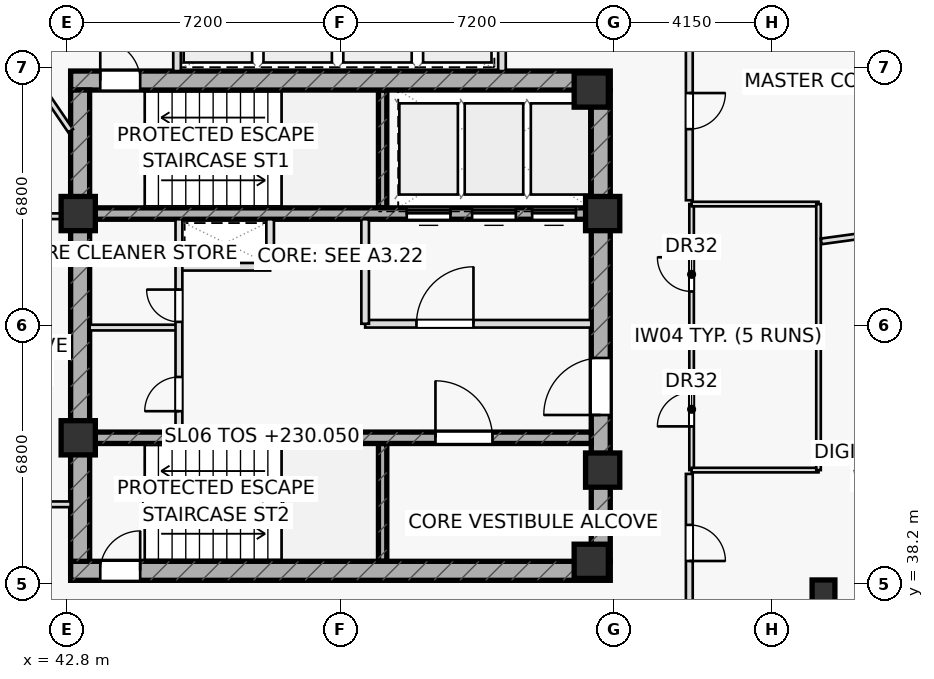
"""IFC4 building model, lengths in metres.
Left out: names, types, materials, properties, quantities, classifications, styles, units other than length and angle.
Written with IfcOpenShell. Run it as: python <this file> out.ifc"""

import sys

from ifc_helpers import new_model, si_unit, direction, frame, frame_2d, origin, origin_2d, place, context, subcontext, project, spatial, rectangle, hollow_rectangle, extrude, element, fill, save


model = new_model("IFC4")
c1 = context("Model", 3, precision=1e-05, world=origin(), true_north=direction((0.0, 1.0)))
c2 = subcontext(c1, "Body", "Model", "MODEL_VIEW")
j1 = project(units=[si_unit("LENGTHUNIT", "METRE"), si_unit("PLANEANGLEUNIT", "RADIAN")], contexts=[c1])
p1 = place(None, origin())
s1 = spatial("IfcSite", under=j1, at=p1, CompositionType="ELEMENT")
p2 = place(p1, origin())
s2 = spatial("IfcBuilding", under=s1, at=p2, CompositionType="ELEMENT")
p3 = place(p2, frame((0.0, 0.0, 230.05)))
s3 = spatial("IfcBuildingStorey", under=s2, at=p3, CompositionType="ELEMENT", Elevation=230.05)
for number, where, z_axis, x_axis in (
    (1, (51.11, 48.1, 0.0), (0.0, 0.0, 1.0), (0.0, 1.0, 0.0)),
    (2, (51.11, 38.8, 0.0), (0.0, 0.0, 1.0), (0.0, 1.0, 0.0)),
):
    element("IfcWall", number, at=place(p3, frame(where, z_axis=z_axis, x_axis=x_axis)), inside=s3, PredefinedType="SHEAR", context=c2, shape_type="SweptSolid", body=[
        extrude(rectangle(XDim=3.1, YDim=0.22, at=frame_2d((1.55, 0.0))), origin(), (0.0, 0.0, 1.0), 3.65),
    ])
p4 = place(p3, frame((42.9, 51.45, 0.0), z_axis=(0.0, 0.0, 1.0), x_axis=(1.0, 0.0, 0.0)))
e3 = element("IfcWall", 3, at=p4, inside=s3, PredefinedType="SHEAR", context=c2, shape_type="SweptSolid", body=[
    extrude(rectangle(XDim=14.2, YDim=0.5, at=frame_2d((7.1, 0.0))), origin(), (0.0, 0.0, 1.0), 3.65),
])
p5 = place(p4, frame((0.78, 0.0, 0.0)))
e4 = element("IfcOpeningElement", 4, at=p5, cuts=e3, PredefinedType="OPENING", context=c2, shape_type="SweptSolid", body=[
    extrude(rectangle(XDim=1.05, YDim=2.2, at=frame_2d((0.525, 1.1))), frame((0.0, 0.26, 0.0), z_axis=(0.0, -1.0, 0.0), x_axis=(1.0, 0.0, 0.0)), (0.0, 0.0, 1.0), 0.52),
])
p6 = place(p3, frame((42.9, 38.55, 0.0), z_axis=(0.0, 0.0, 1.0), x_axis=(1.0, 0.0, 0.0)))
e5 = element("IfcWall", 5, at=p6, inside=s3, PredefinedType="SHEAR", context=c2, shape_type="SweptSolid", body=[
    extrude(rectangle(XDim=14.2, YDim=0.5, at=frame_2d((7.1, 0.0))), origin(), (0.0, 0.0, 1.0), 3.65),
])
p7 = place(p6, frame((0.78, 0.0, 0.0)))
e6 = element("IfcOpeningElement", 6, at=p7, cuts=e5, PredefinedType="OPENING", context=c2, shape_type="SweptSolid", body=[
    extrude(rectangle(XDim=1.05, YDim=2.2, at=frame_2d((0.525, 1.1))), frame((0.0, 0.26, 0.0), z_axis=(0.0, -1.0, 0.0), x_axis=(1.0, 0.0, 0.0)), (0.0, 0.0, 1.0), 0.52),
])
p8 = place(p3, frame((43.15, 38.8, 0.0), z_axis=(0.0, 0.0, 1.0), x_axis=(0.0, 1.0, 0.0)))
e7 = element("IfcWall", 7, at=p8, inside=s3, PredefinedType="SHEAR", context=c2, shape_type="SweptSolid", body=[
    extrude(rectangle(XDim=12.4, YDim=0.5, at=frame_2d((6.2, 0.0))), origin(), (0.0, 0.0, 1.0), 3.65),
])
p9 = place(p3, frame((56.85, 38.8, 0.0), z_axis=(0.0, 0.0, 1.0), x_axis=(0.0, 1.0, 0.0)))
e8 = element("IfcWall", 8, at=p9, inside=s3, PredefinedType="SHEAR", context=c2, shape_type="SweptSolid", body=[
    extrude(rectangle(XDim=12.4, YDim=0.5, at=frame_2d((6.2, 0.0))), origin(), (0.0, 0.0, 1.0), 3.65),
])
p10 = place(p9, frame((3.85, 0.0, 0.0)))
e9 = element("IfcOpeningElement", 9, at=p10, cuts=e8, PredefinedType="OPENING", context=c2, shape_type="SweptSolid", body=[
    extrude(rectangle(XDim=1.5, YDim=2.2, at=frame_2d((0.75, 1.1))), frame((0.0, 0.26, 0.0), z_axis=(0.0, -1.0, 0.0), x_axis=(1.0, 0.0, 0.0)), (0.0, 0.0, 1.0), 0.52),
])
p11 = place(p3, frame((43.4, 47.95, 0.0), z_axis=(0.0, 0.0, 1.0), x_axis=(1.0, 0.0, 0.0)))
e10 = element("IfcWall", 10, at=p11, inside=s3, PredefinedType="SHEAR", context=c2, shape_type="SweptSolid", body=[
    extrude(rectangle(XDim=13.2, YDim=0.3, at=frame_2d((6.6, 0.0))), origin(), (0.0, 0.0, 1.0), 3.65),
])
p12 = place(p11, frame((8.345, 0.0, 0.0)))
e11 = element("IfcOpeningElement", 11, at=p12, cuts=e10, PredefinedType="OPENING", context=c2, shape_type="SweptSolid", body=[
    extrude(rectangle(XDim=1.15, YDim=2.2, at=frame_2d((0.575, 1.1))), frame((0.0, 0.16, 0.0), z_axis=(0.0, -1.0, 0.0), x_axis=(1.0, 0.0, 0.0)), (0.0, 0.0, 1.0), 0.32),
])
p13 = place(p11, frame((10.065, 0.0, 0.0)))
e12 = element("IfcOpeningElement", 12, at=p13, cuts=e10, PredefinedType="OPENING", context=c2, shape_type="SweptSolid", body=[
    extrude(rectangle(XDim=1.15, YDim=2.2, at=frame_2d((0.575, 1.1))), frame((0.0, 0.16, 0.0), z_axis=(0.0, -1.0, 0.0), x_axis=(1.0, 0.0, 0.0)), (0.0, 0.0, 1.0), 0.32),
])
p14 = place(p11, frame((11.645, 0.0, 0.0)))
e13 = element("IfcOpeningElement", 13, at=p14, cuts=e10, PredefinedType="OPENING", context=c2, shape_type="SweptSolid", body=[
    extrude(rectangle(XDim=1.15, YDim=2.2, at=frame_2d((0.575, 1.1))), frame((0.0, 0.16, 0.0), z_axis=(0.0, -1.0, 0.0), x_axis=(1.0, 0.0, 0.0)), (0.0, 0.0, 1.0), 0.32),
])
p15 = place(p3, frame((43.4, 42.05, 0.0), z_axis=(0.0, 0.0, 1.0), x_axis=(1.0, 0.0, 0.0)))
e14 = element("IfcWall", 14, at=p15, inside=s3, PredefinedType="SHEAR", context=c2, shape_type="SweptSolid", body=[
    extrude(rectangle(XDim=13.2, YDim=0.3, at=frame_2d((6.6, 0.0))), origin(), (0.0, 0.0, 1.0), 3.65),
])
p16 = place(p15, frame((9.1, 0.0, 0.0)))
e15 = element("IfcOpeningElement", 15, at=p16, cuts=e14, PredefinedType="OPENING", context=c2, shape_type="SweptSolid", body=[
    extrude(rectangle(XDim=1.5, YDim=2.2, at=frame_2d((0.75, 1.1))), frame((0.0, 0.16, 0.0), z_axis=(0.0, -1.0, 0.0), x_axis=(1.0, 0.0, 0.0)), (0.0, 0.0, 1.0), 0.32),
])
for number, where, z_axis, x_axis in (
    (16, (43.1, 47.95, 0.0), (0.0, 0.0, 1.0), (1.0, 0.0, 0.0)),
    (17, (56.9, 47.95, 0.0), (0.0, 0.0, 1.0), (1.0, 0.0, 0.0)),
    (18, (56.6, 51.2, 0.0), (0.0, 0.0, 1.0), (1.0, 0.0, 0.0)),
    (19, (43.1, 42.05, 0.0), (0.0, 0.0, 1.0), (1.0, 0.0, 0.0)),
    (20, (56.9, 41.2, 0.0), (0.0, 0.0, 1.0), (1.0, 0.0, 0.0)),
    (21, (56.6, 38.8, 0.0), (0.0, 0.0, 1.0), (1.0, 0.0, 0.0)),
):
    element("IfcColumn", number, at=place(p3, frame(where, z_axis=z_axis, x_axis=x_axis)), inside=s3, PredefinedType="COLUMN", context=c2, shape_type="SweptSolid", body=[
        extrude(rectangle(XDim=0.9, YDim=0.9, at=origin_2d()), origin(), (0.0, 0.0, 1.0), 3.65),
    ])
p17 = place(p3, frame((62.711, 38.009, 0.0), z_axis=(0.0, 0.0, 1.0), x_axis=(1.0, 0.0, 0.0)))
e22 = element("IfcColumn", 22, at=p17, inside=s3, PredefinedType="COLUMN", context=c2, shape_type="SweptSolid", body=[
    extrude(hollow_rectangle(XDim=0.6, YDim=0.6, WallThickness=0.036, at=origin_2d()), origin(), (0.0, 0.0, 1.0), 3.65),
])
for number, where, z_axis, x_axis in (
    (23, (45.7, 51.7, 0.0), (0.0, 0.0, 1.0), (0.0, 1.0, 0.0)),
    (24, (54.25, 51.7, 0.0), (0.0, 0.0, 1.0), (0.0, 1.0, 0.0)),
):
    element("IfcWall", number, at=place(p3, frame(where, z_axis=z_axis, x_axis=x_axis)), inside=s3, PredefinedType="PARTITIONING", context=c2, shape_type="SweptSolid", body=[
        extrude(rectangle(XDim=2.6, YDim=0.2, at=frame_2d((1.3, 0.0))), origin(), (0.0, 0.0, 1.0), 3.65),
    ])
p18 = place(p3, frame((45.75, 46.55, 0.0), z_axis=(0.0, 0.0, 1.0), x_axis=(1.0, 0.0, 0.0)))
e25 = element("IfcWall", 25, at=p18, inside=s3, PredefinedType="PARTITIONING", context=c2, shape_type="SweptSolid", body=[
    extrude(rectangle(XDim=2.4, YDim=0.2, at=frame_2d((1.2, 0.0))), origin(), (0.0, 0.0, 1.0), 3.65),
])
p19 = place(p3, frame((48.15, 46.55, 0.0), z_axis=(0.0, 0.0, 1.0), x_axis=(0.0, 1.0, 0.0)))
e26 = element("IfcWall", 26, at=p19, inside=s3, PredefinedType="PARTITIONING", context=c2, shape_type="SweptSolid", body=[
    extrude(rectangle(XDim=1.25, YDim=0.2, at=frame_2d((0.625, 0.0))), origin(), (0.0, 0.0, 1.0), 3.65),
])
p20 = place(p3, frame((50.65, 45.05, 0.0), z_axis=(0.0, 0.0, 1.0), x_axis=(1.0, 0.0, 0.0)))
e27 = element("IfcWall", 27, at=p20, inside=s3, PredefinedType="PARTITIONING", context=c2, shape_type="SweptSolid", body=[
    extrude(rectangle(XDim=5.95, YDim=0.2, at=frame_2d((2.975, 0.0))), origin(), (0.0, 0.0, 1.0), 3.65),
])
p21 = place(p20, frame((1.35, 0.0, 0.0)))
e28 = element("IfcOpeningElement", 28, at=p21, cuts=e27, PredefinedType="OPENING", context=c2, shape_type="SweptSolid", body=[
    extrude(rectangle(XDim=1.5, YDim=2.2, at=frame_2d((0.75, 1.1))), frame((0.0, 0.11, 0.0), z_axis=(0.0, -1.0, 0.0), x_axis=(1.0, 0.0, 0.0)), (0.0, 0.0, 1.0), 0.22),
])
p22 = place(p3, frame((50.65, 45.05, 0.0), z_axis=(0.0, 0.0, 1.0), x_axis=(0.0, 1.0, 0.0)))
e29 = element("IfcWall", 29, at=p22, inside=s3, PredefinedType="PARTITIONING", context=c2, shape_type="SweptSolid", body=[
    extrude(rectangle(XDim=2.75, YDim=0.2, at=frame_2d((1.375, 0.0))), origin(), (0.0, 0.0, 1.0), 3.65),
])
p23 = place(p3, frame((43.4, 44.95, 0.0), z_axis=(0.0, 0.0, 1.0), x_axis=(1.0, 0.0, 0.0)))
e30 = element("IfcWall", 30, at=p23, inside=s3, PredefinedType="PARTITIONING", context=c2, shape_type="SweptSolid", body=[
    extrude(rectangle(XDim=2.35, YDim=0.15, at=frame_2d((1.175, 0.0))), origin(), (0.0, 0.0, 1.0), 3.65),
])
p24 = place(p3, frame((45.75, 42.2, 0.0), z_axis=(0.0, 0.0, 1.0), x_axis=(0.0, 1.0, 0.0)))
e31 = element("IfcWall", 31, at=p24, inside=s3, PredefinedType="PARTITIONING", context=c2, shape_type="SweptSolid", body=[
    extrude(rectangle(XDim=5.6, YDim=0.18, at=frame_2d((2.8, 0.0))), origin(), (0.0, 0.0, 1.0), 3.65),
])
p25 = place(p24, frame((0.55, 0.0, 0.0)))
e32 = element("IfcOpeningElement", 32, at=p25, cuts=e31, PredefinedType="OPENING", context=c2, shape_type="SweptSolid", body=[
    extrude(rectangle(XDim=0.9, YDim=2.05, at=frame_2d((0.45, 1.025))), frame((0.0, 0.1, 0.0), z_axis=(0.0, -1.0, 0.0), x_axis=(1.0, 0.0, 0.0)), (0.0, 0.0, 1.0), 0.2),
])
p26 = place(p24, frame((2.9, 0.0, 0.0)))
e33 = element("IfcOpeningElement", 33, at=p26, cuts=e31, PredefinedType="OPENING", context=c2, shape_type="SweptSolid", body=[
    extrude(rectangle(XDim=0.85, YDim=2.05, at=frame_2d((0.425, 1.025))), frame((0.0, 0.1, 0.0), z_axis=(0.0, -1.0, 0.0), x_axis=(1.0, 0.0, 0.0)), (0.0, 0.0, 1.0), 0.2),
])
p27 = place(p3, frame((69.792, 50.388, 0.0), z_axis=(0.0, 0.0, 1.0), x_axis=(-0.732769799181, 0.680476613418, 0.0)))
e34 = element("IfcWall", 34, at=p27, inside=s3, PredefinedType="PARTITIONING", context=c2, shape_type="SweptSolid", body=[
    extrude(rectangle(XDim=11.378, YDim=0.15, at=frame_2d((5.689, 0.0))), origin(), (0.0, 0.0, 1.0), 3.025),
])
p28 = place(p3, frame((37.14, 40.3, 0.0), z_axis=(0.0, 0.0, 1.0), x_axis=(1.0, 0.0, 0.0)))
e35 = element("IfcWall", 35, at=p28, inside=s3, PredefinedType="PARTITIONING", context=c2, shape_type="SweptSolid", body=[
    extrude(rectangle(XDim=5.76, YDim=0.15, at=frame_2d((2.88, 0.0))), origin(), (0.0, 0.0, 1.0), 3.025),
])
p29 = place(p28, frame((3.21, 0.0, 0.0)))
e36 = element("IfcOpeningElement", 36, at=p29, cuts=e35, PredefinedType="OPENING", context=c2, shape_type="SweptSolid", body=[
    extrude(rectangle(XDim=0.95, YDim=2.05, at=frame_2d((0.475, 1.025))), frame((0.0, 0.085, 0.0), z_axis=(0.0, -1.0, 0.0), x_axis=(1.0, 0.0, 0.0)), (0.0, 0.0, 1.0), 0.17),
])
p30 = place(p3, frame((37.14, 47.88, 0.0), z_axis=(0.0, 0.0, 1.0), x_axis=(1.0, 0.0, 0.0)))
e37 = element("IfcWall", 37, at=p30, inside=s3, PredefinedType="PARTITIONING", context=c2, shape_type="SweptSolid", body=[
    extrude(rectangle(XDim=5.76, YDim=0.15, at=frame_2d((2.88, 0.0))), origin(), (0.0, 0.0, 1.0), 3.025),
])
p31 = place(p3, frame((59.24, 41.2, 0.0), z_axis=(0.0, 0.0, 1.0), x_axis=(0.0, 1.0, 0.0)))
e38 = element("IfcWall", 38, at=p31, inside=s3, PredefinedType="PARTITIONING", context=c2, shape_type="SweptSolid", body=[
    extrude(rectangle(XDim=7.0, YDim=0.12, at=frame_2d((3.5, 0.0))), origin(), (0.0, 0.0, 1.0), 3.65),
])
p32 = place(p31, frame((1.15, 0.0, 0.0)))
e39 = element("IfcOpeningElement", 39, at=p32, cuts=e38, PredefinedType="OPENING", context=c2, shape_type="SweptSolid", body=[
    extrude(rectangle(XDim=0.9, YDim=2.05, at=frame_2d((0.45, 1.025))), frame((0.0, 0.07, 0.0), z_axis=(0.0, -1.0, 0.0), x_axis=(1.0, 0.0, 0.0)), (0.0, 0.0, 1.0), 0.14),
])
p33 = place(p31, frame((4.7, 0.0, 0.0)))
e40 = element("IfcOpeningElement", 40, at=p33, cuts=e38, PredefinedType="OPENING", context=c2, shape_type="SweptSolid", body=[
    extrude(rectangle(XDim=0.9, YDim=2.05, at=frame_2d((0.45, 1.025))), frame((0.0, 0.07, 0.0), z_axis=(0.0, -1.0, 0.0), x_axis=(1.0, 0.0, 0.0)), (0.0, 0.0, 1.0), 0.14),
])
p34 = place(p3, frame((59.24, 41.2, 0.0), z_axis=(0.0, 0.0, 1.0), x_axis=(1.0, 0.0, 0.0)))
e41 = element("IfcWall", 41, at=p34, inside=s3, PredefinedType="PARTITIONING", context=c2, shape_type="SweptSolid", body=[
    extrude(rectangle(XDim=3.34, YDim=0.12, at=frame_2d((1.67, 0.0))), origin(), (0.0, 0.0, 1.0), 3.025),
])
for number, where, z_axis, x_axis in (
    (42, (59.24, 44.65, 0.0), (0.0, 0.0, 1.0), (1.0, 0.0, 0.0)),
    (43, (59.24, 48.2, 0.0), (0.0, 0.0, 1.0), (1.0, 0.0, 0.0)),
):
    element("IfcWall", number, at=place(p3, frame(where, z_axis=z_axis, x_axis=x_axis)), inside=s3, PredefinedType="PARTITIONING", context=c2, shape_type="SweptSolid", body=[
        extrude(rectangle(XDim=3.34, YDim=0.12, at=frame_2d((1.67, 0.0))), origin(), (0.0, 0.0, 1.0), 3.65),
    ])
p35 = place(p3, frame((62.58, 41.2, 0.0), z_axis=(0.0, 0.0, 1.0), x_axis=(0.0, 1.0, 0.0)))
e44 = element("IfcWall", 44, at=p35, inside=s3, PredefinedType="PARTITIONING", context=c2, shape_type="SweptSolid", body=[
    extrude(rectangle(XDim=7.0, YDim=0.12, at=frame_2d((3.5, 0.0))), origin(), (0.0, 0.0, 1.0), 3.325),
])
p36 = place(p3, frame((59.18, 37.752, 0.0), z_axis=(0.0, 0.0, 1.0), x_axis=(0.869846344998, -0.493322750432, 0.0)))
e45 = element("IfcWall", 45, at=p36, inside=s3, PredefinedType="PARTITIONING", context=c2, shape_type="SweptSolid", body=[
    extrude(rectangle(XDim=5.242, YDim=0.15, at=frame_2d((2.621, 0.0))), origin(), (0.0, 0.0, 1.0), 3.135),
])
p37 = place(p3, frame((62.65, 47.218, 0.0), z_axis=(0.0, 0.0, 1.0), x_axis=(0.990815623429, 0.135219822396, 0.0)))
e46 = element("IfcWall", 46, at=p37, inside=s3, PredefinedType="PARTITIONING", context=c2, shape_type="SweptSolid", body=[
    extrude(rectangle(XDim=9.605, YDim=0.15, at=frame_2d((4.803, 0.0))), origin(), (0.0, 0.0, 1.0), 3.135),
])
p38 = place(p3, frame((42.9, 50.128, 0.0), z_axis=(0.0, 0.0, 1.0), x_axis=(-0.563742719505, 0.825950450212, 0.0)))
e47 = element("IfcWall", 47, at=p38, inside=s3, PredefinedType="PARTITIONING", context=c2, shape_type="SweptSolid", body=[
    extrude(rectangle(XDim=18.773, YDim=0.15, at=frame_2d((9.386, 0.0))), origin(), (0.0, 0.0, 1.0), 3.025),
])
p39 = place(p38, frame((1.35, 0.0, 0.0)))
e48 = element("IfcOpeningElement", 48, at=p39, cuts=e47, PredefinedType="OPENING", context=c2, shape_type="SweptSolid", body=[
    extrude(rectangle(XDim=0.95, YDim=2.05, at=frame_2d((0.475, 1.025))), frame((0.0, 0.085, 0.0), z_axis=(0.0, -1.0, 0.0), x_axis=(1.0, 0.0, 0.0)), (0.0, 0.0, 1.0), 0.17),
])
p40 = place(p3, frame((59.18, 53.83, 0.0), z_axis=(0.0, 0.0, 1.0), x_axis=(0.0, -1.0, 0.0)))
e49 = element("IfcWall", 49, at=p40, inside=s3, PredefinedType="PARTITIONING", context=c2, shape_type="SweptSolid", body=[
    extrude(rectangle(XDim=5.53, YDim=0.18, at=frame_2d((2.765, 0.0))), origin(), (0.0, 0.0, 1.0), 3.65),
])
p41 = place(p40, frame((2.709, 0.0, 0.0)))
e50 = element("IfcOpeningElement", 50, at=p41, cuts=e49, PredefinedType="OPENING", context=c2, shape_type="SweptSolid", body=[
    extrude(rectangle(XDim=0.95, YDim=2.05, at=frame_2d((0.475, 1.025))), frame((0.0, 0.1, 0.0), z_axis=(0.0, -1.0, 0.0), x_axis=(1.0, 0.0, 0.0)), (0.0, 0.0, 1.0), 0.2),
])
p42 = place(p3, frame((59.18, 41.1, 0.0), z_axis=(0.0, 0.0, 1.0), x_axis=(0.0, -1.0, 0.0)))
e51 = element("IfcWall", 51, at=p42, inside=s3, PredefinedType="PARTITIONING", context=c2, shape_type="SweptSolid", body=[
    extrude(rectangle(XDim=4.93, YDim=0.18, at=frame_2d((2.465, 0.0))), origin(), (0.0, 0.0, 1.0), 3.325),
])
p43 = place(p42, frame((1.342, 0.0, 0.0)))
e52 = element("IfcOpeningElement", 52, at=p43, cuts=e51, PredefinedType="OPENING", context=c2, shape_type="SweptSolid", body=[
    extrude(rectangle(XDim=0.95, YDim=2.05, at=frame_2d((0.475, 1.025))), frame((0.0, 0.1, 0.0), z_axis=(0.0, -1.0, 0.0), x_axis=(1.0, 0.0, 0.0)), (0.0, 0.0, 1.0), 0.2),
])
p44 = place(p5, origin())
e53 = element("IfcDoor", 53, at=p44, inside=s3, OperationType="SINGLE_SWING_LEFT", PredefinedType="DOOR", context=c2, shape_type="SweptSolid", body=[
    extrude(rectangle(XDim=1.05, YDim=2.2, at=frame_2d((0.525, 1.1))), frame((0.0, 0.025, 0.0), z_axis=(0.0, -1.0, 0.0), x_axis=(1.0, 0.0, 0.0)), (0.0, 0.0, 1.0), 0.05),
])
fill(e4, e53)
p45 = place(p7, origin())
e54 = element("IfcDoor", 54, at=p45, inside=s3, OperationType="SINGLE_SWING_RIGHT", PredefinedType="DOOR", context=c2, shape_type="SweptSolid", body=[
    extrude(rectangle(XDim=1.05, YDim=2.2, at=frame_2d((0.525, 1.1))), frame((0.0, 0.025, 0.0), z_axis=(0.0, -1.0, 0.0), x_axis=(1.0, 0.0, 0.0)), (0.0, 0.0, 1.0), 0.05),
])
fill(e6, e54)
p46 = place(p10, origin())
e55 = element("IfcDoor", 55, at=p46, inside=s3, OperationType="SINGLE_SWING_LEFT", PredefinedType="DOOR", context=c2, shape_type="SweptSolid", body=[
    extrude(rectangle(XDim=1.5, YDim=2.2, at=frame_2d((0.75, 1.1))), frame((0.0, 0.025, 0.0), z_axis=(0.0, -1.0, 0.0), x_axis=(1.0, 0.0, 0.0)), (0.0, 0.0, 1.0), 0.05),
])
fill(e9, e55)
p47 = place(p21, origin())
e56 = element("IfcDoor", 56, at=p47, inside=s3, OperationType="SINGLE_SWING_RIGHT", PredefinedType="DOOR", context=c2, shape_type="SweptSolid", body=[
    extrude(rectangle(XDim=1.5, YDim=2.2, at=frame_2d((0.75, 1.1))), frame((0.0, 0.025, 0.0), z_axis=(0.0, -1.0, 0.0), x_axis=(1.0, 0.0, 0.0)), (0.0, 0.0, 1.0), 0.05),
])
fill(e28, e56)
p48 = place(p16, origin())
e57 = element("IfcDoor", 57, at=p48, inside=s3, OperationType="SINGLE_SWING_LEFT", PredefinedType="DOOR", context=c2, shape_type="SweptSolid", body=[
    extrude(rectangle(XDim=1.5, YDim=2.2, at=frame_2d((0.75, 1.1))), frame((0.0, 0.025, 0.0), z_axis=(0.0, -1.0, 0.0), x_axis=(1.0, 0.0, 0.0)), (0.0, 0.0, 1.0), 0.05),
])
fill(e15, e57)
p49 = place(p25, origin())
e58 = element("IfcDoor", 58, at=p49, inside=s3, OperationType="SINGLE_SWING_LEFT", PredefinedType="DOOR", context=c2, shape_type="SweptSolid", body=[
    extrude(rectangle(XDim=0.9, YDim=2.05, at=frame_2d((0.45, 1.025))), frame((0.0, 0.025, 0.0), z_axis=(0.0, -1.0, 0.0), x_axis=(1.0, 0.0, 0.0)), (0.0, 0.0, 1.0), 0.05),
])
fill(e32, e58)
p50 = place(p26, origin())
e59 = element("IfcDoor", 59, at=p50, inside=s3, OperationType="SINGLE_SWING_RIGHT", PredefinedType="DOOR", context=c2, shape_type="SweptSolid", body=[
    extrude(rectangle(XDim=0.85, YDim=2.05, at=frame_2d((0.425, 1.025))), frame((0.0, 0.025, 0.0), z_axis=(0.0, -1.0, 0.0), x_axis=(1.0, 0.0, 0.0)), (0.0, 0.0, 1.0), 0.05),
])
fill(e33, e59)
p51 = place(p32, origin())
e60 = element("IfcDoor", 60, at=p51, inside=s3, OperationType="SINGLE_SWING_LEFT", PredefinedType="DOOR", context=c2, shape_type="SweptSolid", body=[
    extrude(rectangle(XDim=0.9, YDim=2.05, at=frame_2d((0.45, 1.025))), frame((0.0, 0.025, 0.0), z_axis=(0.0, -1.0, 0.0), x_axis=(1.0, 0.0, 0.0)), (0.0, 0.0, 1.0), 0.05),
])
fill(e39, e60)
p52 = place(p33, origin())
e61 = element("IfcDoor", 61, at=p52, inside=s3, OperationType="SINGLE_SWING_RIGHT", PredefinedType="DOOR", context=c2, shape_type="SweptSolid", body=[
    extrude(rectangle(XDim=0.9, YDim=2.05, at=frame_2d((0.45, 1.025))), frame((0.0, 0.025, 0.0), z_axis=(0.0, -1.0, 0.0), x_axis=(1.0, 0.0, 0.0)), (0.0, 0.0, 1.0), 0.05),
])
fill(e40, e61)
p53 = place(p41, origin())
e62 = element("IfcDoor", 62, at=p53, inside=s3, OperationType="SINGLE_SWING_LEFT", PredefinedType="DOOR", context=c2, shape_type="SweptSolid", body=[
    extrude(rectangle(XDim=0.95, YDim=2.05, at=frame_2d((0.475, 1.025))), frame((0.0, 0.025, 0.0), z_axis=(0.0, -1.0, 0.0), x_axis=(1.0, 0.0, 0.0)), (0.0, 0.0, 1.0), 0.05),
])
fill(e50, e62)
p54 = place(p43, origin())
e63 = element("IfcDoor", 63, at=p54, inside=s3, OperationType="SINGLE_SWING_RIGHT", PredefinedType="DOOR", context=c2, shape_type="SweptSolid", body=[
    extrude(rectangle(XDim=0.95, YDim=2.05, at=frame_2d((0.475, 1.025))), frame((0.0, 0.025, 0.0), z_axis=(0.0, -1.0, 0.0), x_axis=(1.0, 0.0, 0.0)), (0.0, 0.0, 1.0), 0.05),
])
fill(e52, e63)
p55 = place(p12, origin())
e64 = element("IfcDoor", 64, at=p55, inside=s3, OperationType="SLIDING_TO_LEFT", PredefinedType="DOOR", context=c2, shape_type="SweptSolid", body=[
    extrude(rectangle(XDim=1.15, YDim=2.2, at=frame_2d((0.575, 1.1))), frame((0.0, 0.025, 0.0), z_axis=(0.0, -1.0, 0.0), x_axis=(1.0, 0.0, 0.0)), (0.0, 0.0, 1.0), 0.05),
])
fill(e11, e64)
p56 = place(p13, origin())
e65 = element("IfcDoor", 65, at=p56, inside=s3, OperationType="SLIDING_TO_LEFT", PredefinedType="DOOR", context=c2, shape_type="SweptSolid", body=[
    extrude(rectangle(XDim=1.15, YDim=2.2, at=frame_2d((0.575, 1.1))), frame((0.0, 0.025, 0.0), z_axis=(0.0, -1.0, 0.0), x_axis=(1.0, 0.0, 0.0)), (0.0, 0.0, 1.0), 0.05),
])
fill(e12, e65)
p57 = place(p14, origin())
e66 = element("IfcDoor", 66, at=p57, inside=s3, OperationType="SLIDING_TO_LEFT", PredefinedType="DOOR", context=c2, shape_type="SweptSolid", body=[
    extrude(rectangle(XDim=1.15, YDim=2.2, at=frame_2d((0.575, 1.1))), frame((0.0, 0.025, 0.0), z_axis=(0.0, -1.0, 0.0), x_axis=(1.0, 0.0, 0.0)), (0.0, 0.0, 1.0), 0.05),
])
fill(e13, e66)
save(model, sys.argv[1])
